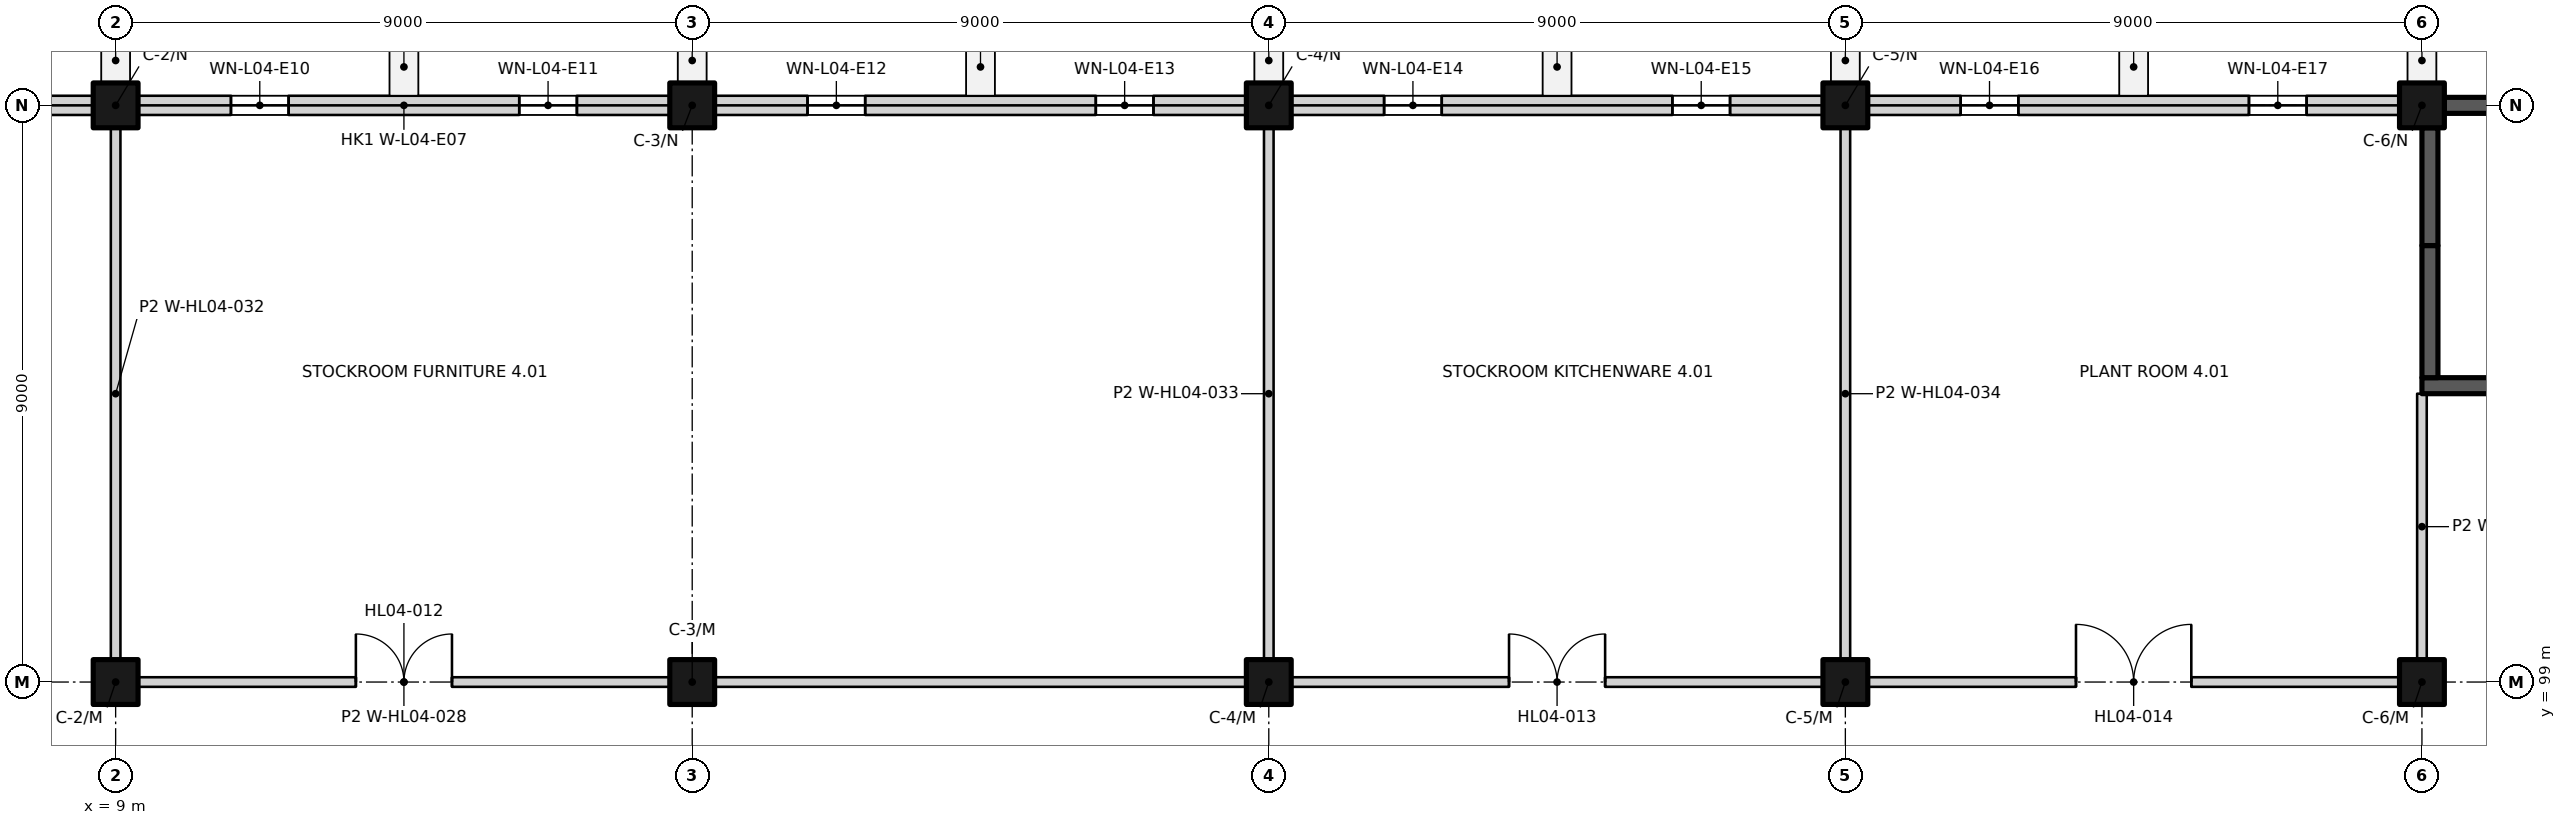
"""IFC4 building model, lengths in metres.
Left out: names, types, materials, properties, quantities, classifications, styles, units other than length and angle.
Written with IfcOpenShell. Run it as: python <this file> out.ifc"""

import sys

from ifc_helpers import new_model, si_unit, direction, frame, frame_2d, origin, origin_2d, place, context, subcontext, project, spatial, rectangle, extrude, element, fill, save


model = new_model("IFC4")
c1 = context("Model", 3, precision=1e-05, world=origin(), true_north=direction((0.0, 1.0)))
c2 = subcontext(c1, "Body", "Model", "MODEL_VIEW")
j1 = project(units=[si_unit("LENGTHUNIT", "METRE"), si_unit("PLANEANGLEUNIT", "RADIAN")], contexts=[c1])
p1 = place(None, origin())
s1 = spatial("IfcSite", under=j1, at=p1, CompositionType="ELEMENT")
p2 = place(p1, origin())
s2 = spatial("IfcBuilding", under=s1, at=p2, CompositionType="ELEMENT")
p3 = place(p2, frame((0.0, 0.0, 19.5)))
s3 = spatial("IfcBuildingStorey", under=s2, at=p3, CompositionType="ELEMENT", Elevation=19.5)
for number, where, z_axis, x_axis in (
    (1, (9.0, 99.0, 0.0), (0.0, 0.0, 1.0), (1.0, 0.0, 0.0)),
    (2, (18.0, 99.0, 0.0), (0.0, 0.0, 1.0), (1.0, 0.0, 0.0)),
    (3, (27.0, 99.0, 0.0), (0.0, 0.0, 1.0), (1.0, 0.0, 0.0)),
    (4, (36.0, 99.0, 0.0), (0.0, 0.0, 1.0), (1.0, 0.0, 0.0)),
    (5, (45.0, 99.0, 0.0), (0.0, 0.0, 1.0), (1.0, 0.0, 0.0)),
    (6, (9.0, 108.0, 0.0), (0.0, 0.0, 1.0), (1.0, 0.0, 0.0)),
    (7, (18.0, 108.0, 0.0), (0.0, 0.0, 1.0), (1.0, 0.0, 0.0)),
    (8, (27.0, 108.0, 0.0), (0.0, 0.0, 1.0), (1.0, 0.0, 0.0)),
    (9, (36.0, 108.0, 0.0), (0.0, 0.0, 1.0), (1.0, 0.0, 0.0)),
    (10, (45.0, 108.0, 0.0), (0.0, 0.0, 1.0), (1.0, 0.0, 0.0)),
):
    element("IfcColumn", number, at=place(p3, frame(where, z_axis=z_axis, x_axis=x_axis)), inside=s3, PredefinedType="COLUMN", context=c2, shape_type="SweptSolid", body=[
        extrude(rectangle(XDim=0.7, YDim=0.7, at=origin_2d()), origin(), (0.0, 0.0, 1.0), 4.5),
    ])
p4 = place(p3, frame((45.0, 103.625, 0.0), z_axis=(0.0, 0.0, 1.0), x_axis=(1.0, 0.0, 0.0)))
e11 = element("IfcWall", 11, at=p4, inside=s3, PredefinedType="SHEAR", context=c2, shape_type="SweptSolid", body=[
    extrude(rectangle(XDim=9.0, YDim=0.25, at=frame_2d((4.5, 0.0))), origin(), (0.0, 0.0, 1.0), 4.5),
])
p5 = place(p3, frame((45.35, 108.0, 0.0), z_axis=(0.0, 0.0, 1.0), x_axis=(1.0, 0.0, 0.0)))
e12 = element("IfcWall", 12, at=p5, inside=s3, PredefinedType="SHEAR", context=c2, shape_type="SweptSolid", body=[
    extrude(rectangle(XDim=8.3, YDim=0.25, at=frame_2d((4.15, 0.0))), origin(), (0.0, 0.0, 1.0), 4.5),
])
p6 = place(p3, frame((45.125, 103.75, 0.0), z_axis=(0.0, 0.0, 1.0), x_axis=(0.0, 1.0, 0.0)))
e13 = element("IfcWall", 13, at=p6, inside=s3, PredefinedType="SHEAR", context=c2, shape_type="SweptSolid", body=[
    extrude(rectangle(XDim=2.062, YDim=0.25, at=frame_2d((1.031, 0.0))), origin(), (0.0, 0.0, 1.0), 4.5),
])
p7 = place(p3, frame((45.125, 105.812, 0.0), z_axis=(0.0, 0.0, 1.0), x_axis=(0.0, 1.0, 0.0)))
e14 = element("IfcWall", 14, at=p7, inside=s3, PredefinedType="SHEAR", context=c2, shape_type="SweptSolid", body=[
    extrude(rectangle(XDim=1.838, YDim=0.25, at=frame_2d((0.919, 0.0))), origin(), (0.0, 0.0, 1.0), 4.5),
])
p8 = place(p3, frame((4.5, 108.0, 0.0), z_axis=(0.0, 0.0, 1.0), x_axis=(1.0, 0.0, 0.0)))
e15 = element("IfcWall", 15, at=p8, inside=s3, PredefinedType="SOLIDWALL", context=c2, shape_type="SweptSolid", body=[
    extrude(rectangle(XDim=4.15, YDim=0.3, at=frame_2d((2.075, 0.0))), origin(), (0.0, 0.0, 1.0), 3.7),
])
p9 = place(p8, frame((1.8, 0.0, 0.45)))
e16 = element("IfcOpeningElement", 16, at=p9, cuts=e15, PredefinedType="OPENING", context=c2, shape_type="SweptSolid", body=[
    extrude(rectangle(XDim=0.9, YDim=3.0, at=frame_2d((0.45, 1.5))), frame((0.0, 0.16, 0.0), z_axis=(0.0, -1.0, 0.0), x_axis=(1.0, 0.0, 0.0)), (0.0, 0.0, 1.0), 0.32),
])
p10 = place(p3, frame((9.35, 108.0, 0.0), z_axis=(0.0, 0.0, 1.0), x_axis=(1.0, 0.0, 0.0)))
e17 = element("IfcWall", 17, at=p10, inside=s3, PredefinedType="SOLIDWALL", context=c2, shape_type="SweptSolid", body=[
    extrude(rectangle(XDim=8.3, YDim=0.3, at=frame_2d((4.15, 0.0))), origin(), (0.0, 0.0, 1.0), 3.7),
])
p11 = place(p10, frame((1.45, 0.0, 0.45)))
e18 = element("IfcOpeningElement", 18, at=p11, cuts=e17, PredefinedType="OPENING", context=c2, shape_type="SweptSolid", body=[
    extrude(rectangle(XDim=0.9, YDim=3.0, at=frame_2d((0.45, 1.5))), frame((0.0, 0.16, 0.0), z_axis=(0.0, -1.0, 0.0), x_axis=(1.0, 0.0, 0.0)), (0.0, 0.0, 1.0), 0.32),
])
p12 = place(p10, frame((5.95, 0.0, 0.45)))
e19 = element("IfcOpeningElement", 19, at=p12, cuts=e17, PredefinedType="OPENING", context=c2, shape_type="SweptSolid", body=[
    extrude(rectangle(XDim=0.9, YDim=3.0, at=frame_2d((0.45, 1.5))), frame((0.0, 0.16, 0.0), z_axis=(0.0, -1.0, 0.0), x_axis=(1.0, 0.0, 0.0)), (0.0, 0.0, 1.0), 0.32),
])
p13 = place(p3, frame((18.35, 108.0, 0.0), z_axis=(0.0, 0.0, 1.0), x_axis=(1.0, 0.0, 0.0)))
e20 = element("IfcWall", 20, at=p13, inside=s3, PredefinedType="SOLIDWALL", context=c2, shape_type="SweptSolid", body=[
    extrude(rectangle(XDim=8.3, YDim=0.3, at=frame_2d((4.15, 0.0))), origin(), (0.0, 0.0, 1.0), 3.7),
])
p14 = place(p13, frame((1.45, 0.0, 0.45)))
e21 = element("IfcOpeningElement", 21, at=p14, cuts=e20, PredefinedType="OPENING", context=c2, shape_type="SweptSolid", body=[
    extrude(rectangle(XDim=0.9, YDim=3.0, at=frame_2d((0.45, 1.5))), frame((0.0, 0.16, 0.0), z_axis=(0.0, -1.0, 0.0), x_axis=(1.0, 0.0, 0.0)), (0.0, 0.0, 1.0), 0.32),
])
p15 = place(p13, frame((5.95, 0.0, 0.45)))
e22 = element("IfcOpeningElement", 22, at=p15, cuts=e20, PredefinedType="OPENING", context=c2, shape_type="SweptSolid", body=[
    extrude(rectangle(XDim=0.9, YDim=3.0, at=frame_2d((0.45, 1.5))), frame((0.0, 0.16, 0.0), z_axis=(0.0, -1.0, 0.0), x_axis=(1.0, 0.0, 0.0)), (0.0, 0.0, 1.0), 0.32),
])
p16 = place(p3, frame((27.35, 108.0, 0.0), z_axis=(0.0, 0.0, 1.0), x_axis=(1.0, 0.0, 0.0)))
e23 = element("IfcWall", 23, at=p16, inside=s3, PredefinedType="SOLIDWALL", context=c2, shape_type="SweptSolid", body=[
    extrude(rectangle(XDim=8.3, YDim=0.3, at=frame_2d((4.15, 0.0))), origin(), (0.0, 0.0, 1.0), 3.7),
])
p17 = place(p16, frame((1.45, 0.0, 0.45)))
e24 = element("IfcOpeningElement", 24, at=p17, cuts=e23, PredefinedType="OPENING", context=c2, shape_type="SweptSolid", body=[
    extrude(rectangle(XDim=0.9, YDim=3.0, at=frame_2d((0.45, 1.5))), frame((0.0, 0.16, 0.0), z_axis=(0.0, -1.0, 0.0), x_axis=(1.0, 0.0, 0.0)), (0.0, 0.0, 1.0), 0.32),
])
p18 = place(p16, frame((5.95, 0.0, 0.45)))
e25 = element("IfcOpeningElement", 25, at=p18, cuts=e23, PredefinedType="OPENING", context=c2, shape_type="SweptSolid", body=[
    extrude(rectangle(XDim=0.9, YDim=3.0, at=frame_2d((0.45, 1.5))), frame((0.0, 0.16, 0.0), z_axis=(0.0, -1.0, 0.0), x_axis=(1.0, 0.0, 0.0)), (0.0, 0.0, 1.0), 0.32),
])
p19 = place(p3, frame((36.35, 108.0, 0.0), z_axis=(0.0, 0.0, 1.0), x_axis=(1.0, 0.0, 0.0)))
e26 = element("IfcWall", 26, at=p19, inside=s3, PredefinedType="SOLIDWALL", context=c2, shape_type="SweptSolid", body=[
    extrude(rectangle(XDim=8.3, YDim=0.3, at=frame_2d((4.15, 0.0))), origin(), (0.0, 0.0, 1.0), 3.7),
])
p20 = place(p19, frame((1.45, 0.0, 0.45)))
e27 = element("IfcOpeningElement", 27, at=p20, cuts=e26, PredefinedType="OPENING", context=c2, shape_type="SweptSolid", body=[
    extrude(rectangle(XDim=0.9, YDim=3.0, at=frame_2d((0.45, 1.5))), frame((0.0, 0.16, 0.0), z_axis=(0.0, -1.0, 0.0), x_axis=(1.0, 0.0, 0.0)), (0.0, 0.0, 1.0), 0.32),
])
p21 = place(p19, frame((5.95, 0.0, 0.45)))
e28 = element("IfcOpeningElement", 28, at=p21, cuts=e26, PredefinedType="OPENING", context=c2, shape_type="SweptSolid", body=[
    extrude(rectangle(XDim=0.9, YDim=3.0, at=frame_2d((0.45, 1.5))), frame((0.0, 0.16, 0.0), z_axis=(0.0, -1.0, 0.0), x_axis=(1.0, 0.0, 0.0)), (0.0, 0.0, 1.0), 0.32),
])
p22 = place(p3, frame((9.35, 99.0, 0.0), z_axis=(0.0, 0.0, 1.0), x_axis=(1.0, 0.0, 0.0)))
e29 = element("IfcWall", 29, at=p22, inside=s3, PredefinedType="PARTITIONING", context=c2, shape_type="SweptSolid", body=[
    extrude(rectangle(XDim=8.3, YDim=0.15, at=frame_2d((4.15, 0.0))), origin(), (0.0, 0.0, 1.0), 4.2),
])
p23 = place(p22, frame((3.4, 0.0, 0.0)))
e30 = element("IfcOpeningElement", 30, at=p23, cuts=e29, PredefinedType="OPENING", context=c2, shape_type="SweptSolid", body=[
    extrude(rectangle(XDim=1.5, YDim=2.1, at=frame_2d((0.75, 1.05))), frame((0.0, 0.085, 0.0), z_axis=(0.0, -1.0, 0.0), x_axis=(1.0, 0.0, 0.0)), (0.0, 0.0, 1.0), 0.17),
])
p24 = place(p3, frame((18.35, 99.0, 0.0), z_axis=(0.0, 0.0, 1.0), x_axis=(1.0, 0.0, 0.0)))
e31 = element("IfcWall", 31, at=p24, inside=s3, PredefinedType="PARTITIONING", context=c2, shape_type="SweptSolid", body=[
    extrude(rectangle(XDim=8.3, YDim=0.15, at=frame_2d((4.15, 0.0))), origin(), (0.0, 0.0, 1.0), 4.2),
])
p25 = place(p3, frame((27.35, 99.0, 0.0), z_axis=(0.0, 0.0, 1.0), x_axis=(1.0, 0.0, 0.0)))
e32 = element("IfcWall", 32, at=p25, inside=s3, PredefinedType="PARTITIONING", context=c2, shape_type="SweptSolid", body=[
    extrude(rectangle(XDim=8.3, YDim=0.15, at=frame_2d((4.15, 0.0))), origin(), (0.0, 0.0, 1.0), 4.2),
])
p26 = place(p25, frame((3.4, 0.0, 0.0)))
e33 = element("IfcOpeningElement", 33, at=p26, cuts=e32, PredefinedType="OPENING", context=c2, shape_type="SweptSolid", body=[
    extrude(rectangle(XDim=1.5, YDim=2.1, at=frame_2d((0.75, 1.05))), frame((0.0, 0.085, 0.0), z_axis=(0.0, -1.0, 0.0), x_axis=(1.0, 0.0, 0.0)), (0.0, 0.0, 1.0), 0.17),
])
p27 = place(p3, frame((36.35, 99.0, 0.0), z_axis=(0.0, 0.0, 1.0), x_axis=(1.0, 0.0, 0.0)))
e34 = element("IfcWall", 34, at=p27, inside=s3, PredefinedType="PARTITIONING", context=c2, shape_type="SweptSolid", body=[
    extrude(rectangle(XDim=8.3, YDim=0.15, at=frame_2d((4.15, 0.0))), origin(), (0.0, 0.0, 1.0), 4.2),
])
p28 = place(p27, frame((3.25, 0.0, 0.0)))
e35 = element("IfcOpeningElement", 35, at=p28, cuts=e34, PredefinedType="OPENING", context=c2, shape_type="SweptSolid", body=[
    extrude(rectangle(XDim=1.8, YDim=2.4, at=frame_2d((0.9, 1.2))), frame((0.0, 0.085, 0.0), z_axis=(0.0, -1.0, 0.0), x_axis=(1.0, 0.0, 0.0)), (0.0, 0.0, 1.0), 0.17),
])
for number, where, z_axis, x_axis in (
    (36, (9.0, 99.35, 0.0), (0.0, 0.0, 1.0), (0.0, 1.0, 0.0)),
    (37, (27.0, 99.35, 0.0), (0.0, 0.0, 1.0), (0.0, 1.0, 0.0)),
    (38, (36.0, 99.35, 0.0), (0.0, 0.0, 1.0), (0.0, 1.0, 0.0)),
):
    element("IfcWall", number, at=place(p3, frame(where, z_axis=z_axis, x_axis=x_axis)), inside=s3, PredefinedType="PARTITIONING", context=c2, shape_type="SweptSolid", body=[
        extrude(rectangle(XDim=8.3, YDim=0.15, at=frame_2d((4.15, 0.0))), origin(), (0.0, 0.0, 1.0), 4.2),
    ])
p29 = place(p3, frame((45.0, 99.35, 0.0), z_axis=(0.0, 0.0, 1.0), x_axis=(0.0, 1.0, 0.0)))
e39 = element("IfcWall", 39, at=p29, inside=s3, PredefinedType="PARTITIONING", context=c2, shape_type="SweptSolid", body=[
    extrude(rectangle(XDim=4.15, YDim=0.15, at=frame_2d((2.075, 0.0))), origin(), (0.0, 0.0, 1.0), 4.2),
])
p30 = place(p11, origin())
e40 = element("IfcWindow", 40, at=p30, inside=s3, PartitioningType="SINGLE_PANEL", PredefinedType="WINDOW", context=c2, shape_type="SweptSolid", body=[
    extrude(rectangle(XDim=0.9, YDim=3.0, at=frame_2d((0.45, 1.5))), frame((0.0, -0.03, 0.0), z_axis=(0.0, -1.0, 0.0), x_axis=(1.0, 0.0, 0.0)), (0.0, 0.0, 1.0), 0.06),
])
fill(e18, e40)
p31 = place(p12, origin())
e41 = element("IfcWindow", 41, at=p31, inside=s3, PartitioningType="SINGLE_PANEL", PredefinedType="WINDOW", context=c2, shape_type="SweptSolid", body=[
    extrude(rectangle(XDim=0.9, YDim=3.0, at=frame_2d((0.45, 1.5))), frame((0.0, -0.03, 0.0), z_axis=(0.0, -1.0, 0.0), x_axis=(1.0, 0.0, 0.0)), (0.0, 0.0, 1.0), 0.06),
])
fill(e19, e41)
p32 = place(p14, origin())
e42 = element("IfcWindow", 42, at=p32, inside=s3, PartitioningType="SINGLE_PANEL", PredefinedType="WINDOW", context=c2, shape_type="SweptSolid", body=[
    extrude(rectangle(XDim=0.9, YDim=3.0, at=frame_2d((0.45, 1.5))), frame((0.0, -0.03, 0.0), z_axis=(0.0, -1.0, 0.0), x_axis=(1.0, 0.0, 0.0)), (0.0, 0.0, 1.0), 0.06),
])
fill(e21, e42)
p33 = place(p15, origin())
e43 = element("IfcWindow", 43, at=p33, inside=s3, PartitioningType="SINGLE_PANEL", PredefinedType="WINDOW", context=c2, shape_type="SweptSolid", body=[
    extrude(rectangle(XDim=0.9, YDim=3.0, at=frame_2d((0.45, 1.5))), frame((0.0, -0.03, 0.0), z_axis=(0.0, -1.0, 0.0), x_axis=(1.0, 0.0, 0.0)), (0.0, 0.0, 1.0), 0.06),
])
fill(e22, e43)
p34 = place(p17, origin())
e44 = element("IfcWindow", 44, at=p34, inside=s3, PartitioningType="SINGLE_PANEL", PredefinedType="WINDOW", context=c2, shape_type="SweptSolid", body=[
    extrude(rectangle(XDim=0.9, YDim=3.0, at=frame_2d((0.45, 1.5))), frame((0.0, -0.03, 0.0), z_axis=(0.0, -1.0, 0.0), x_axis=(1.0, 0.0, 0.0)), (0.0, 0.0, 1.0), 0.06),
])
fill(e24, e44)
p35 = place(p18, origin())
e45 = element("IfcWindow", 45, at=p35, inside=s3, PartitioningType="SINGLE_PANEL", PredefinedType="WINDOW", context=c2, shape_type="SweptSolid", body=[
    extrude(rectangle(XDim=0.9, YDim=3.0, at=frame_2d((0.45, 1.5))), frame((0.0, -0.03, 0.0), z_axis=(0.0, -1.0, 0.0), x_axis=(1.0, 0.0, 0.0)), (0.0, 0.0, 1.0), 0.06),
])
fill(e25, e45)
p36 = place(p20, origin())
e46 = element("IfcWindow", 46, at=p36, inside=s3, PartitioningType="SINGLE_PANEL", PredefinedType="WINDOW", context=c2, shape_type="SweptSolid", body=[
    extrude(rectangle(XDim=0.9, YDim=3.0, at=frame_2d((0.45, 1.5))), frame((0.0, -0.03, 0.0), z_axis=(0.0, -1.0, 0.0), x_axis=(1.0, 0.0, 0.0)), (0.0, 0.0, 1.0), 0.06),
])
fill(e27, e46)
p37 = place(p21, origin())
e47 = element("IfcWindow", 47, at=p37, inside=s3, PartitioningType="SINGLE_PANEL", PredefinedType="WINDOW", context=c2, shape_type="SweptSolid", body=[
    extrude(rectangle(XDim=0.9, YDim=3.0, at=frame_2d((0.45, 1.5))), frame((0.0, -0.03, 0.0), z_axis=(0.0, -1.0, 0.0), x_axis=(1.0, 0.0, 0.0)), (0.0, 0.0, 1.0), 0.06),
])
fill(e28, e47)
p38 = place(p23, origin())
e48 = element("IfcDoor", 48, at=p38, inside=s3, OperationType="DOUBLE_DOOR_SINGLE_SWING", PredefinedType="DOOR", context=c2, shape_type="SweptSolid", body=[
    extrude(rectangle(XDim=1.5, YDim=2.1, at=frame_2d((0.75, 1.05))), frame((0.0, 0.025, 0.0), z_axis=(0.0, -1.0, 0.0), x_axis=(1.0, 0.0, 0.0)), (0.0, 0.0, 1.0), 0.05),
])
fill(e30, e48)
p39 = place(p26, origin())
e49 = element("IfcDoor", 49, at=p39, inside=s3, OperationType="DOUBLE_DOOR_SINGLE_SWING", PredefinedType="DOOR", context=c2, shape_type="SweptSolid", body=[
    extrude(rectangle(XDim=1.5, YDim=2.1, at=frame_2d((0.75, 1.05))), frame((0.0, 0.025, 0.0), z_axis=(0.0, -1.0, 0.0), x_axis=(1.0, 0.0, 0.0)), (0.0, 0.0, 1.0), 0.05),
])
fill(e33, e49)
p40 = place(p28, origin())
e50 = element("IfcDoor", 50, at=p40, inside=s3, OperationType="DOUBLE_DOOR_SINGLE_SWING", PredefinedType="DOOR", context=c2, shape_type="SweptSolid", body=[
    extrude(rectangle(XDim=1.8, YDim=2.4, at=frame_2d((0.9, 1.2))), frame((0.0, 0.025, 0.0), z_axis=(0.0, -1.0, 0.0), x_axis=(1.0, 0.0, 0.0)), (0.0, 0.0, 1.0), 0.05),
])
fill(e35, e50)
save(model, sys.argv[1])
